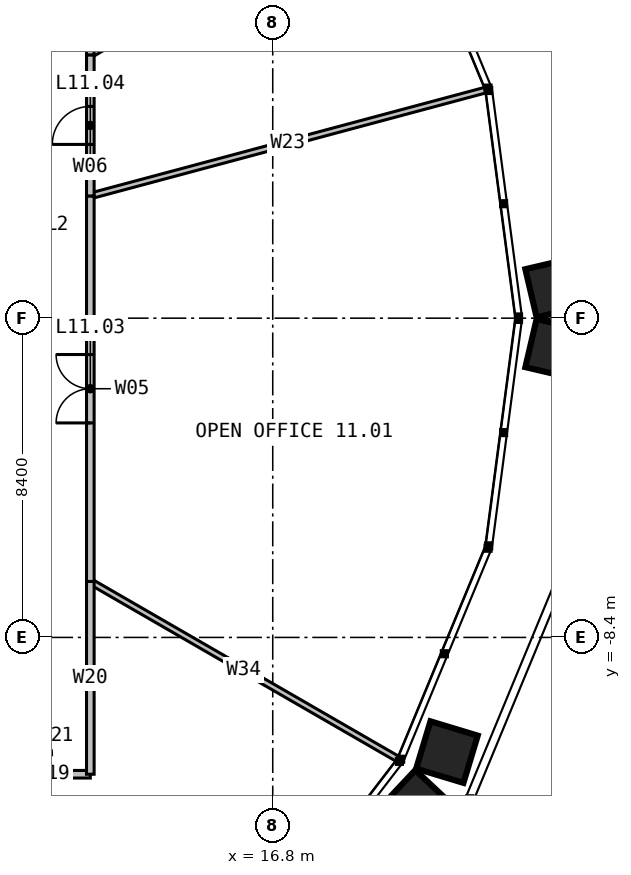
"""IFC4 building model, lengths in metres.
Left out: names, types, materials, properties, quantities, classifications, styles, units other than length and angle.
Written with IfcOpenShell. Run it as: python <this file> out.ifc"""

import sys

from ifc_helpers import new_model, si_unit, direction, frame, frame_2d, origin, place, context, subcontext, project, spatial, rectangle, extrude, element, fill, save


model = new_model("IFC4")
c1 = context("Model", 3, precision=1e-05, world=origin(), true_north=direction((0.0, 1.0)))
c2 = subcontext(c1, "Body", "Model", "MODEL_VIEW")
j1 = project(units=[si_unit("LENGTHUNIT", "METRE"), si_unit("PLANEANGLEUNIT", "RADIAN")], contexts=[c1])
p1 = place(None, origin())
s1 = spatial("IfcSite", under=j1, at=p1, CompositionType="ELEMENT")
p2 = place(p1, origin())
s2 = spatial("IfcBuilding", under=s1, at=p2, CompositionType="ELEMENT")
p3 = place(p2, frame((0.0, 0.0, 49.0)))
s3 = spatial("IfcBuildingStorey", under=s2, at=p3, CompositionType="ELEMENT", Elevation=49.0)
p4 = place(p3, frame((12.0, -6.928, 0.0), z_axis=(0.0, 0.0, 1.0), x_axis=(0.866028610261, -0.499994446179, 0.0)))
e1 = element("IfcWall", 1, at=p4, inside=s3, PredefinedType="PARTITIONING", context=c2, shape_type="SweptSolid", body=[
    extrude(rectangle(XDim=9.324, YDim=0.15, at=frame_2d((4.662, 0.0))), origin(), (0.0, 0.0, 1.0), 2.79),
])
p5 = place(p3, frame((12.0, 3.215, 0.0), z_axis=(0.0, 0.0, 1.0), x_axis=(0.965923838539, 0.258826463373, 0.0)))
e2 = element("IfcWall", 2, at=p5, inside=s3, PredefinedType="PARTITIONING", context=c2, shape_type="SweptSolid", body=[
    extrude(rectangle(XDim=10.757, YDim=0.15, at=frame_2d((5.378, 0.0))), origin(), (0.0, 0.0, 1.0), 2.79),
])
p6 = place(p3, frame((12.0, 6.928, 0.0), z_axis=(0.0, 0.0, 1.0), x_axis=(0.866028610261, 0.499994446179, 0.0)))
e3 = element("IfcWall", 3, at=p6, inside=s3, PredefinedType="PARTITIONING", context=c2, shape_type="SweptSolid", body=[
    extrude(rectangle(XDim=9.324, YDim=0.15, at=frame_2d((4.662, 0.0))), origin(), (0.0, 0.0, 1.0), 2.79),
])
p7 = place(p3, frame((12.0, -6.928, 0.0), z_axis=(0.0, 0.0, 1.0), x_axis=(0.0, 1.0, 0.0)))
e4 = element("IfcWall", 4, at=p7, inside=s3, PredefinedType="PARTITIONING", context=c2, shape_type="SweptSolid", body=[
    extrude(rectangle(XDim=10.144, YDim=0.2, at=frame_2d((5.072, 0.0))), origin(), (0.0, 0.0, 1.0), 3.8),
])
p8 = place(p7, frame((4.172, 0.0, 0.0)))
e5 = element("IfcOpeningElement", 5, at=p8, cuts=e4, PredefinedType="OPENING", context=c2, shape_type="SweptSolid", body=[
    extrude(rectangle(XDim=1.8, YDim=2.2, at=frame_2d((0.9, 1.1))), frame((0.0, 0.11, 0.0), z_axis=(0.0, -1.0, 0.0), x_axis=(1.0, 0.0, 0.0)), (0.0, 0.0, 1.0), 0.22),
])
p9 = place(p3, frame((12.0, 3.215, 0.0), z_axis=(0.0, 0.0, 1.0), x_axis=(0.0, 1.0, 0.0)))
e6 = element("IfcWall", 6, at=p9, inside=s3, PredefinedType="PARTITIONING", context=c2, shape_type="SweptSolid", body=[
    extrude(rectangle(XDim=3.713, YDim=0.2, at=frame_2d((1.856, 0.0))), origin(), (0.0, 0.0, 1.0), 3.8),
])
p10 = place(p9, frame((1.356, 0.0, 0.0)))
e7 = element("IfcOpeningElement", 7, at=p10, cuts=e6, PredefinedType="OPENING", context=c2, shape_type="SweptSolid", body=[
    extrude(rectangle(XDim=1.0, YDim=2.2, at=frame_2d((0.5, 1.1))), frame((0.0, 0.11, 0.0), z_axis=(0.0, -1.0, 0.0), x_axis=(1.0, 0.0, 0.0)), (0.0, 0.0, 1.0), 0.22),
])
p11 = place(p3, frame((12.0, 6.928, 0.0), z_axis=(0.0, 0.0, 1.0), x_axis=(0.0, 1.0, 0.0)))
e8 = element("IfcWall", 8, at=p11, inside=s3, PredefinedType="PARTITIONING", context=c2, shape_type="SweptSolid", body=[
    extrude(rectangle(XDim=5.072, YDim=0.2, at=frame_2d((2.536, 0.0))), origin(), (0.0, 0.0, 1.0), 3.8),
])
p12 = place(p11, frame((2.036, 0.0, 0.0)))
e9 = element("IfcOpeningElement", 9, at=p12, cuts=e8, PredefinedType="OPENING", context=c2, shape_type="SweptSolid", body=[
    extrude(rectangle(XDim=1.0, YDim=2.2, at=frame_2d((0.5, 1.1))), frame((0.0, 0.11, 0.0), z_axis=(0.0, -1.0, 0.0), x_axis=(1.0, 0.0, 0.0)), (0.0, 0.0, 1.0), 0.22),
])
p13 = place(p3, frame((10.0, -12.0, 0.0), z_axis=(0.0, 0.0, 1.0), x_axis=(1.0, 0.0, 0.0)))
e10 = element("IfcWall", 10, at=p13, inside=s3, PredefinedType="PARTITIONING", context=c2, shape_type="SweptSolid", body=[
    extrude(rectangle(XDim=2.0, YDim=0.2, at=frame_2d((1.0, 0.0))), origin(), (0.0, 0.0, 1.0), 3.8),
])
p14 = place(p3, frame((12.0, -12.0, 0.0), z_axis=(0.0, 0.0, 1.0), x_axis=(0.0, 1.0, 0.0)))
e11 = element("IfcWall", 11, at=p14, inside=s3, PredefinedType="PARTITIONING", context=c2, shape_type="SweptSolid", body=[
    extrude(rectangle(XDim=5.072, YDim=0.2, at=frame_2d((2.536, 0.0))), origin(), (0.0, 0.0, 1.0), 3.8),
])
p15 = place(p8, origin())
e12 = element("IfcDoor", 12, at=p15, inside=s3, OperationType="DOUBLE_DOOR_SINGLE_SWING", PredefinedType="DOOR", context=c2, shape_type="SweptSolid", body=[
    extrude(rectangle(XDim=1.8, YDim=2.2, at=frame_2d((0.9, 1.1))), frame((0.0, 0.025, 0.0), z_axis=(0.0, -1.0, 0.0), x_axis=(1.0, 0.0, 0.0)), (0.0, 0.0, 1.0), 0.05),
])
fill(e5, e12)
p16 = place(p10, origin())
e13 = element("IfcDoor", 13, at=p16, inside=s3, OperationType="SINGLE_SWING_LEFT", PredefinedType="DOOR", context=c2, shape_type="SweptSolid", body=[
    extrude(rectangle(XDim=1.0, YDim=2.2, at=frame_2d((0.5, 1.1))), frame((0.0, 0.025, 0.0), z_axis=(0.0, -1.0, 0.0), x_axis=(1.0, 0.0, 0.0)), (0.0, 0.0, 1.0), 0.05),
])
fill(e7, e13)
save(model, sys.argv[1])
